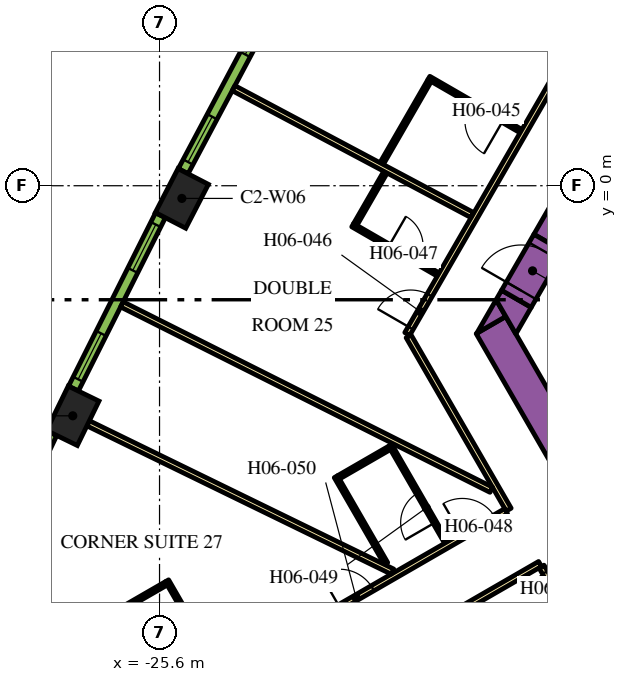
"""IFC4 building model, lengths in metres.
Left out: names, types, materials, properties, quantities, classifications, styles, units other than length and angle.
Written with IfcOpenShell. Run it as: python <this file> out.ifc"""

import sys

from ifc_helpers import new_model, si_unit, direction, frame, frame_2d, origin, origin_2d, place, context, subcontext, project, spatial, polyline, rectangle, outline, extrude, element, fill, save


model = new_model("IFC4")
c1 = context("Model", 3, precision=1e-05, world=origin(), true_north=direction((0.0, 1.0)))
c2 = subcontext(c1, "Body", "Model", "MODEL_VIEW")
j1 = project(units=[si_unit("LENGTHUNIT", "METRE"), si_unit("PLANEANGLEUNIT", "RADIAN")], contexts=[c1])
p1 = place(None, origin())
s1 = spatial("IfcSite", under=j1, at=p1, CompositionType="ELEMENT")
p2 = place(p1, origin())
s2 = spatial("IfcBuilding", under=s1, at=p2, CompositionType="ELEMENT")
p3 = place(p2, frame((0.0, 0.0, 87.6)))
s3 = spatial("IfcBuildingStorey", under=s2, at=p3, CompositionType="ELEMENT", Elevation=87.6)
for number, where, z_axis, x_axis in (
    (1, (-25.012, -0.334, 0.0), (0.0, 0.0, 1.0), (-0.459, -0.888, 0.0)),
    (2, (-27.883, -6.054, 0.0), (0.0, 0.0, 1.0), (-0.438, -0.899, 0.0)),
):
    element("IfcColumn", number, at=place(p3, frame(where, z_axis=z_axis, x_axis=x_axis)), inside=s3, PredefinedType="COLUMN", context=c2, shape_type="SweptSolid", body=[
        extrude(rectangle(XDim=1.3, YDim=0.9, at=origin_2d()), origin(), (0.0, 0.0, 1.0), 3.9),
    ])
p4 = place(p3, frame((-15.36, -1.503, 0.0), z_axis=(0.0, 0.0, 1.0), x_axis=(0.50000389221, 0.866023156604, 0.0)))
e3 = element("IfcWall", 3, at=p4, inside=s3, PredefinedType="SOLIDWALL", context=c2, shape_type="SweptSolid", body=[
    extrude(rectangle(XDim=21.0, YDim=0.9, at=frame_2d((10.5, 0.0))), origin(), (0.0, 0.0, 1.0), 3.9),
])
p5 = place(p3, frame((-12.134, -11.883, 0.0), z_axis=(0.0, 0.0, 1.0), x_axis=(-0.500005339912, 0.866022320763, 0.0)))
e4 = element("IfcWall", 4, at=p5, inside=s3, PredefinedType="SOLIDWALL", context=c2, shape_type="SweptSolid", body=[
    extrude(rectangle(XDim=9.488, YDim=0.9, at=frame_2d((4.744, 0.0))), origin(), (0.0, 0.0, 1.0), 3.9),
])
p6 = place(p3, origin())
e5 = element("IfcWall", 5, at=p6, inside=s3, PredefinedType="SOLIDWALL", context=c2, shape_type="SweptSolid", body=[
    extrude(outline(polyline([(-16.489, -3.44), (-17.251, -3.88), (-16.743, -3.0), (-16.489, -3.44)])), origin(), (0.0, 0.0, 1.0), 3.9),
])
e6 = element("IfcWall", 6, at=p6, inside=s3, PredefinedType="SOLIDWALL", context=c2, shape_type="SweptSolid", body=[
    extrude(outline(polyline([(-15.82, -3.201), (-16.223, -3.9), (-16.743, -3.0), (-16.599, -2.751), (-15.82, -3.201)])), origin(), (0.0, 0.0, 1.0), 3.9),
])
p7 = place(p3, frame((-16.209, -2.976, 0.0), z_axis=(0.0, 0.0, 1.0), x_axis=(0.499954529098, 0.86605165483, 0.0)))
e7 = element("IfcWall", 7, at=p7, inside=s3, PredefinedType="SOLIDWALL", context=c2, shape_type="SweptSolid", body=[
    extrude(rectangle(XDim=1.7, YDim=0.9, at=frame_2d((0.85, 0.0))), origin(), (0.0, 0.0, 1.0), 3.9),
])
p8 = place(p7, frame((0.25, 0.0, 0.0)))
e8 = element("IfcOpeningElement", 8, at=p8, cuts=e7, PredefinedType="OPENING", context=c2, shape_type="SweptSolid", body=[
    extrude(rectangle(XDim=1.2, YDim=2.1, at=frame_2d((0.6, 1.05))), frame((0.0, 0.46, 0.0), z_axis=(0.0, -1.0, 0.0), x_axis=(1.0, 0.0, 0.0)), (0.0, 0.0, 1.0), 0.92),
])
p9 = place(p3, frame((-19.081, -3.9, 0.0), z_axis=(0.0, 0.0, 1.0), x_axis=(0.499998313975, 0.866026377209, 0.0)))
e9 = element("IfcWall", 9, at=p9, inside=s3, PredefinedType="PARTITIONING", context=c2, shape_type="SweptSolid", body=[
    extrude(rectangle(XDim=25.766, YDim=0.15, at=frame_2d((12.883, 0.0))), origin(), (0.0, 0.0, 1.0), 2.75),
])
p10 = place(p9, frame((19.306, 0.0, 0.0)))
e10 = element("IfcOpeningElement", 10, at=p10, cuts=e9, PredefinedType="OPENING", context=c2, shape_type="SweptSolid", body=[
    extrude(rectangle(XDim=1.0, YDim=2.1, at=frame_2d((0.5, 1.05))), frame((0.0, 0.085, 0.0), z_axis=(0.0, -1.0, 0.0), x_axis=(1.0, 0.0, 0.0)), (0.0, 0.0, 1.0), 0.17),
])
p11 = place(p9, frame((18.0, 0.0, 0.0)))
e11 = element("IfcOpeningElement", 11, at=p11, cuts=e9, PredefinedType="OPENING", context=c2, shape_type="SweptSolid", body=[
    extrude(rectangle(XDim=1.0, YDim=2.1, at=frame_2d((0.5, 1.05))), frame((0.0, 0.085, 0.0), z_axis=(0.0, -1.0, 0.0), x_axis=(1.0, 0.0, 0.0)), (0.0, 0.0, 1.0), 0.17),
])
p12 = place(p9, frame((10.874, 0.0, 0.0)))
e12 = element("IfcOpeningElement", 12, at=p12, cuts=e9, PredefinedType="OPENING", context=c2, shape_type="SweptSolid", body=[
    extrude(rectangle(XDim=0.9, YDim=2.1, at=frame_2d((0.45, 1.05))), frame((0.0, 0.085, 0.0), z_axis=(0.0, -1.0, 0.0), x_axis=(1.0, 0.0, 0.0)), (0.0, 0.0, 1.0), 0.17),
])
p13 = place(p9, frame((8.548, 0.0, 0.0)))
e13 = element("IfcOpeningElement", 13, at=p13, cuts=e9, PredefinedType="OPENING", context=c2, shape_type="SweptSolid", body=[
    extrude(rectangle(XDim=1.1, YDim=2.1, at=frame_2d((0.55, 1.05))), frame((0.0, 0.085, 0.0), z_axis=(0.0, -1.0, 0.0), x_axis=(1.0, 0.0, 0.0)), (0.0, 0.0, 1.0), 0.17),
])
p14 = place(p9, frame((0.18, 0.0, 0.0)))
e14 = element("IfcOpeningElement", 14, at=p14, cuts=e9, PredefinedType="OPENING", context=c2, shape_type="SweptSolid", body=[
    extrude(rectangle(XDim=1.0, YDim=2.1, at=frame_2d((0.5, 1.05))), frame((0.0, 0.085, 0.0), z_axis=(0.0, -1.0, 0.0), x_axis=(1.0, 0.0, 0.0)), (0.0, 0.0, 1.0), 0.17),
])
p15 = place(p3, frame((-16.412, -8.523, 0.0), z_axis=(0.0, 0.0, 1.0), x_axis=(-0.500001929737, 0.866024289647, 0.0)))
e15 = element("IfcWall", 15, at=p15, inside=s3, PredefinedType="PARTITIONING", context=c2, shape_type="SweptSolid", body=[
    extrude(rectangle(XDim=5.268, YDim=0.15, at=frame_2d((2.634, 0.0))), origin(), (0.0, 0.0, 1.0), 2.75),
])
p16 = place(p3, frame((-28.211, -15.335, 0.0), z_axis=(0.0, 0.0, 1.0), x_axis=(0.866025884867, 0.49999916674, 0.0)))
e16 = element("IfcWall", 16, at=p16, inside=s3, PredefinedType="PARTITIONING", context=c2, shape_type="SweptSolid", body=[
    extrude(rectangle(XDim=13.543, YDim=0.15, at=frame_2d((6.772, 0.0))), origin(), (0.0, 0.0, 1.0), 2.75),
])
p17 = place(p16, frame((12.214, 0.0, 0.0)))
e17 = element("IfcOpeningElement", 17, at=p17, cuts=e16, PredefinedType="OPENING", context=c2, shape_type="SweptSolid", body=[
    extrude(rectangle(XDim=1.0, YDim=2.1, at=frame_2d((0.5, 1.05))), frame((0.0, 0.085, 0.0), z_axis=(0.0, -1.0, 0.0), x_axis=(1.0, 0.0, 0.0)), (0.0, 0.0, 1.0), 0.17),
])
p18 = place(p16, frame((8.488, 0.0, 0.0)))
e18 = element("IfcOpeningElement", 18, at=p18, cuts=e16, PredefinedType="OPENING", context=c2, shape_type="SweptSolid", body=[
    extrude(rectangle(XDim=1.0, YDim=2.1, at=frame_2d((0.5, 1.05))), frame((0.0, 0.085, 0.0), z_axis=(0.0, -1.0, 0.0), x_axis=(1.0, 0.0, 0.0)), (0.0, 0.0, 1.0), 0.17),
])
p19 = place(p3, frame((-15.587, -9.952, 0.0), z_axis=(0.0, 0.0, 1.0), x_axis=(-0.866017869832, -0.500013048961, 0.0)))
e19 = element("IfcWall", 19, at=p19, inside=s3, PredefinedType="PARTITIONING", context=c2, shape_type="SweptSolid", body=[
    extrude(rectangle(XDim=13.624, YDim=0.15, at=frame_2d((6.812, 0.0))), origin(), (0.0, 0.0, 1.0), 2.75),
])
p20 = place(p19, frame((4.134, 0.0, 0.0)))
e20 = element("IfcOpeningElement", 20, at=p20, cuts=e19, PredefinedType="OPENING", context=c2, shape_type="SweptSolid", body=[
    extrude(rectangle(XDim=1.0, YDim=2.1, at=frame_2d((0.5, 1.05))), frame((0.0, 0.085, 0.0), z_axis=(0.0, -1.0, 0.0), x_axis=(1.0, 0.0, 0.0)), (0.0, 0.0, 1.0), 0.17),
])
p21 = place(p3, frame((-12.918, -14.575, 0.0), z_axis=(0.0, 0.0, 1.0), x_axis=(-0.500009150678, 0.866020120573, 0.0)))
e21 = element("IfcWall", 21, at=p21, inside=s3, PredefinedType="PARTITIONING", context=c2, shape_type="SweptSolid", body=[
    extrude(rectangle(XDim=5.258, YDim=0.15, at=frame_2d((2.629, 0.0))), origin(), (0.0, 0.0, 1.0), 2.75),
])
p22 = place(p21, frame((4.078, 0.0, 0.0)))
e22 = element("IfcOpeningElement", 22, at=p22, cuts=e21, PredefinedType="OPENING", context=c2, shape_type="SweptSolid", body=[
    extrude(rectangle(XDim=1.0, YDim=2.1, at=frame_2d((0.5, 1.05))), frame((0.0, 0.085, 0.0), z_axis=(0.0, -1.0, 0.0), x_axis=(1.0, 0.0, 0.0)), (0.0, 0.0, 1.0), 0.17),
])
p23 = place(p3, frame((-27.479, -6.251, 0.0), z_axis=(0.0, 0.0, 1.0), x_axis=(0.898945877276, -0.438059710231, 0.0)))
e23 = element("IfcWall", 23, at=p23, inside=s3, PredefinedType="PARTITIONING", context=c2, shape_type="SweptSolid", body=[
    extrude(rectangle(XDim=8.909, YDim=0.15, at=frame_2d((4.455, 0.0))), origin(), (0.0, 0.0, 1.0), 2.75),
])
p24 = place(p3, frame((-23.652, 2.567, 0.0), z_axis=(0.0, 0.0, 1.0), x_axis=(0.883019237957, -0.469336793144, 0.0)))
e24 = element("IfcWall", 24, at=p24, inside=s3, PredefinedType="PARTITIONING", context=c2, shape_type="SweptSolid", body=[
    extrude(rectangle(XDim=7.111, YDim=0.15, at=frame_2d((3.555, 0.0))), origin(), (0.0, 0.0, 1.0), 2.75),
])
p25 = place(p3, frame((-26.591, -3.122, 0.0), z_axis=(0.0, 0.0, 1.0), x_axis=(0.893766213273, -0.448533115847, 0.0)))
e25 = element("IfcWall", 25, at=p25, inside=s3, PredefinedType="PARTITIONING", context=c2, shape_type="SweptSolid", body=[
    extrude(rectangle(XDim=10.875, YDim=0.15, at=frame_2d((5.438, 0.0))), origin(), (0.0, 0.0, 1.0), 2.75),
])
p26 = place(p3, frame((-16.087, 1.436, 0.0), z_axis=(0.0, 0.0, 1.0), x_axis=(-0.866034573852, 0.49998411664, 0.0)))
e26 = element("IfcWall", 26, at=p26, inside=s3, PredefinedType="PARTITIONING", context=c2, shape_type="SweptSolid", body=[
    extrude(rectangle(XDim=2.8, YDim=0.1, at=frame_2d((1.4, 0.0))), origin(), (0.0, 0.0, 1.0), 2.75),
])
p27 = place(p26, frame((0.55, 0.0, 0.0)))
e27 = element("IfcOpeningElement", 27, at=p27, cuts=e26, PredefinedType="OPENING", context=c2, shape_type="SweptSolid", body=[
    extrude(rectangle(XDim=1.0, YDim=2.1, at=frame_2d((0.5, 1.05))), frame((0.0, 0.06, 0.0), z_axis=(0.0, -1.0, 0.0), x_axis=(1.0, 0.0, 0.0)), (0.0, 0.0, 1.0), 0.12),
])
p28 = place(p3, frame((-18.494, 2.768, 0.0), z_axis=(0.0, 0.0, 1.0), x_axis=(-0.500004791531, -0.866022637375, 0.0)))
e28 = element("IfcWall", 28, at=p28, inside=s3, PredefinedType="PARTITIONING", context=c2, shape_type="SweptSolid", body=[
    extrude(rectangle(XDim=2.52, YDim=0.1, at=frame_2d((1.26, 0.0))), origin(), (0.0, 0.0, 1.0), 2.75),
])
p29 = place(p3, frame((-20.518, -1.037, 0.0), z_axis=(0.0, 0.0, 1.0), x_axis=(0.866021400173, -0.500006934395, 0.0)))
e29 = element("IfcWall", 29, at=p29, inside=s3, PredefinedType="PARTITIONING", context=c2, shape_type="SweptSolid", body=[
    extrude(rectangle(XDim=2.6, YDim=0.1, at=frame_2d((1.3, 0.0))), origin(), (0.0, 0.0, 1.0), 2.75),
])
p30 = place(p29, frame((1.1, 0.0, 0.0)))
e30 = element("IfcOpeningElement", 30, at=p30, cuts=e29, PredefinedType="OPENING", context=c2, shape_type="SweptSolid", body=[
    extrude(rectangle(XDim=0.9, YDim=2.1, at=frame_2d((0.45, 1.05))), frame((0.0, 0.06, 0.0), z_axis=(0.0, -1.0, 0.0), x_axis=(1.0, 0.0, 0.0)), (0.0, 0.0, 1.0), 0.12),
])
p31 = place(p3, frame((-20.449, -1.019, 0.0), z_axis=(0.0, 0.0, 1.0), x_axis=(0.500061319399, 0.865989998118, 0.0)))
e31 = element("IfcWall", 31, at=p31, inside=s3, PredefinedType="PARTITIONING", context=c2, shape_type="SweptSolid", body=[
    extrude(rectangle(XDim=1.58, YDim=0.1, at=frame_2d((0.79, 0.0))), origin(), (0.0, 0.0, 1.0), 2.75),
])
p32 = place(p3, frame((-18.055, -9.385, 0.0), z_axis=(0.0, 0.0, 1.0), x_axis=(-0.499939757307, 0.866060182126, 0.0)))
e32 = element("IfcWall", 32, at=p32, inside=s3, PredefinedType="PARTITIONING", context=c2, shape_type="SweptSolid", body=[
    extrude(rectangle(XDim=2.95, YDim=0.1, at=frame_2d((1.475, 0.0))), origin(), (0.0, 0.0, 1.0), 2.75),
])
p33 = place(p32, frame((0.6, 0.0, 0.0)))
e33 = element("IfcOpeningElement", 33, at=p33, cuts=e32, PredefinedType="OPENING", context=c2, shape_type="SweptSolid", body=[
    extrude(rectangle(XDim=0.9, YDim=2.1, at=frame_2d((0.45, 1.05))), frame((0.0, 0.06, 0.0), z_axis=(0.0, -1.0, 0.0), x_axis=(1.0, 0.0, 0.0)), (0.0, 0.0, 1.0), 0.12),
])
p34 = place(p3, frame((-19.549, -6.898, 0.0), z_axis=(0.0, 0.0, 1.0), x_axis=(-0.866043940782, -0.499967891604, 0.0)))
e34 = element("IfcWall", 34, at=p34, inside=s3, PredefinedType="PARTITIONING", context=c2, shape_type="SweptSolid", body=[
    extrude(rectangle(XDim=1.55, YDim=0.1, at=frame_2d((0.775, 0.0))), origin(), (0.0, 0.0, 1.0), 2.75),
])
p35 = place(p3, frame((-19.639, -9.941, 0.0), z_axis=(0.0, 0.0, 1.0), x_axis=(-0.499938597367, 0.866060851709, 0.0)))
e35 = element("IfcWall", 35, at=p35, inside=s3, PredefinedType="PARTITIONING", context=c2, shape_type="SweptSolid", body=[
    extrude(rectangle(XDim=2.64, YDim=0.1, at=frame_2d((1.32, 0.0))), origin(), (0.0, 0.0, 1.0), 2.75),
])
p36 = place(p3, frame((-24.004, -12.82, 0.0), z_axis=(0.0, 0.0, 1.0), x_axis=(-0.500011755427, 0.866018616679, 0.0)))
e36 = element("IfcWall", 36, at=p36, inside=s3, PredefinedType="PARTITIONING", context=c2, shape_type="SweptSolid", body=[
    extrude(rectangle(XDim=2.8, YDim=0.1, at=frame_2d((1.4, 0.0))), origin(), (0.0, 0.0, 1.0), 2.75),
])
p37 = place(p36, frame((0.6, 0.0, 0.0)))
e37 = element("IfcOpeningElement", 37, at=p37, cuts=e36, PredefinedType="OPENING", context=c2, shape_type="SweptSolid", body=[
    extrude(rectangle(XDim=0.9, YDim=2.1, at=frame_2d((0.45, 1.05))), frame((0.0, 0.06, 0.0), z_axis=(0.0, -1.0, 0.0), x_axis=(1.0, 0.0, 0.0)), (0.0, 0.0, 1.0), 0.12),
])
p38 = place(p3, frame((-25.422, -10.463, 0.0), z_axis=(0.0, 0.0, 1.0), x_axis=(-0.866024647952, -0.500001309137, 0.0)))
e38 = element("IfcWall", 38, at=p38, inside=s3, PredefinedType="PARTITIONING", context=c2, shape_type="SweptSolid", body=[
    extrude(rectangle(XDim=2.4, YDim=0.1, at=frame_2d((1.2, 0.0))), origin(), (0.0, 0.0, 1.0), 2.75),
])
p39 = place(p3, frame((-22.583, 4.887, 0.0), z_axis=(0.0, 0.0, 1.0), x_axis=(-0.469323203119, -0.883026461106, 0.0)))
e39 = element("IfcWall", 39, at=p39, inside=s3, PredefinedType="SOLIDWALL", context=c2, shape_type="SweptSolid", body=[
    extrude(rectangle(XDim=5.101, YDim=0.29, at=frame_2d((2.55, 0.0))), origin(), (0.0, 0.0, 1.0), 3.65),
])
p40 = place(p39, frame((0.273, 0.0, 0.9)))
e40 = element("IfcOpeningElement", 40, at=p40, cuts=e39, PredefinedType="OPENING", context=c2, shape_type="SweptSolid", body=[
    extrude(rectangle(XDim=1.35, YDim=2.15, at=frame_2d((0.675, 1.075))), frame((0.0, 0.155, 0.0), z_axis=(0.0, -1.0, 0.0), x_axis=(1.0, 0.0, 0.0)), (0.0, 0.0, 1.0), 0.31),
])
p41 = place(p39, frame((3.478, 0.0, 0.9)))
e41 = element("IfcOpeningElement", 41, at=p41, cuts=e39, PredefinedType="OPENING", context=c2, shape_type="SweptSolid", body=[
    extrude(rectangle(XDim=1.35, YDim=2.15, at=frame_2d((0.675, 1.075))), frame((0.0, 0.155, 0.0), z_axis=(0.0, -1.0, 0.0), x_axis=(1.0, 0.0, 0.0)), (0.0, 0.0, 1.0), 0.31),
])
p42 = place(p3, frame((-25.576, -0.778, 0.0), z_axis=(0.0, 0.0, 1.0), x_axis=(-0.448534297211, -0.893765620409, 0.0)))
e42 = element("IfcWall", 42, at=p42, inside=s3, PredefinedType="SOLIDWALL", context=c2, shape_type="SweptSolid", body=[
    extrude(rectangle(XDim=5.1, YDim=0.29, at=frame_2d((2.55, 0.0))), origin(), (0.0, 0.0, 1.0), 3.65),
])
p43 = place(p42, frame((0.272, 0.0, 0.9)))
e43 = element("IfcOpeningElement", 43, at=p43, cuts=e42, PredefinedType="OPENING", context=c2, shape_type="SweptSolid", body=[
    extrude(rectangle(XDim=1.35, YDim=2.15, at=frame_2d((0.675, 1.075))), frame((0.0, 0.155, 0.0), z_axis=(0.0, -1.0, 0.0), x_axis=(1.0, 0.0, 0.0)), (0.0, 0.0, 1.0), 0.31),
])
p44 = place(p42, frame((3.478, 0.0, 0.9)))
e44 = element("IfcOpeningElement", 44, at=p44, cuts=e42, PredefinedType="OPENING", context=c2, shape_type="SweptSolid", body=[
    extrude(rectangle(XDim=1.35, YDim=2.15, at=frame_2d((0.675, 1.075))), frame((0.0, 0.155, 0.0), z_axis=(0.0, -1.0, 0.0), x_axis=(1.0, 0.0, 0.0)), (0.0, 0.0, 1.0), 0.31),
])
p45 = place(p3, frame((-28.436, -6.511, 0.0), z_axis=(0.0, 0.0, 1.0), x_axis=(-0.427543726596, -0.903994669148, 0.0)))
e45 = element("IfcWall", 45, at=p45, inside=s3, PredefinedType="SOLIDWALL", context=c2, shape_type="SweptSolid", body=[
    extrude(rectangle(XDim=5.107, YDim=0.29, at=frame_2d((2.553, 0.0))), origin(), (0.0, 0.0, 1.0), 3.65),
])
p46 = place(p45, frame((0.285, 0.0, 0.9)))
e46 = element("IfcOpeningElement", 46, at=p46, cuts=e45, PredefinedType="OPENING", context=c2, shape_type="SweptSolid", body=[
    extrude(rectangle(XDim=1.35, YDim=2.15, at=frame_2d((0.675, 1.075))), frame((0.0, 0.155, 0.0), z_axis=(0.0, -1.0, 0.0), x_axis=(1.0, 0.0, 0.0)), (0.0, 0.0, 1.0), 0.31),
])
p47 = place(p45, frame((3.516, 0.0, 0.9)))
e47 = element("IfcOpeningElement", 47, at=p47, cuts=e45, PredefinedType="OPENING", context=c2, shape_type="SweptSolid", body=[
    extrude(rectangle(XDim=1.35, YDim=2.15, at=frame_2d((0.675, 1.075))), frame((0.0, 0.155, 0.0), z_axis=(0.0, -1.0, 0.0), x_axis=(1.0, 0.0, 0.0)), (0.0, 0.0, 1.0), 0.31),
])
p48 = place(p8, origin())
e48 = element("IfcDoor", 48, at=p48, inside=s3, OperationType="SINGLE_SWING_LEFT", PredefinedType="DOOR", context=c2, shape_type="SweptSolid", body=[
    extrude(rectangle(XDim=1.2, YDim=2.1, at=frame_2d((0.6, 1.05))), frame((0.0, 0.025, 0.0), z_axis=(0.0, -1.0, 0.0), x_axis=(1.0, 0.0, 0.0)), (0.0, 0.0, 1.0), 0.05),
])
fill(e8, e48)
p49 = place(p22, origin())
e49 = element("IfcDoor", 49, at=p49, inside=s3, OperationType="SINGLE_SWING_RIGHT", PredefinedType="DOOR", context=c2, shape_type="SweptSolid", body=[
    extrude(rectangle(XDim=1.0, YDim=2.1, at=frame_2d((0.5, 1.05))), frame((0.0, 0.025, 0.0), z_axis=(0.0, -1.0, 0.0), x_axis=(1.0, 0.0, 0.0)), (0.0, 0.0, 1.0), 0.05),
])
fill(e22, e49)
p50 = place(p27, origin())
e50 = element("IfcDoor", 50, at=p50, inside=s3, OperationType="SINGLE_SWING_RIGHT", PredefinedType="DOOR", context=c2, shape_type="SweptSolid", body=[
    extrude(rectangle(XDim=1.0, YDim=2.1, at=frame_2d((0.5, 1.05))), frame((0.0, 0.025, 0.0), z_axis=(0.0, -1.0, 0.0), x_axis=(1.0, 0.0, 0.0)), (0.0, 0.0, 1.0), 0.05),
])
fill(e27, e50)
p51 = place(p14, origin())
e51 = element("IfcDoor", 51, at=p51, inside=s3, OperationType="SINGLE_SWING_LEFT", PredefinedType="DOOR", context=c2, shape_type="SweptSolid", body=[
    extrude(rectangle(XDim=1.0, YDim=2.1, at=frame_2d((0.5, 1.05))), frame((0.0, 0.025, 0.0), z_axis=(0.0, -1.0, 0.0), x_axis=(1.0, 0.0, 0.0)), (0.0, 0.0, 1.0), 0.05),
])
fill(e14, e51)
p52 = place(p30, origin())
e52 = element("IfcDoor", 52, at=p52, inside=s3, OperationType="SINGLE_SWING_LEFT", PredefinedType="DOOR", context=c2, shape_type="SweptSolid", body=[
    extrude(rectangle(XDim=0.9, YDim=2.1, at=frame_2d((0.45, 1.05))), frame((0.0, 0.025, 0.0), z_axis=(0.0, -1.0, 0.0), x_axis=(1.0, 0.0, 0.0)), (0.0, 0.0, 1.0), 0.05),
])
fill(e30, e52)
p53 = place(p17, origin())
e53 = element("IfcDoor", 53, at=p53, inside=s3, OperationType="SINGLE_SWING_RIGHT", PredefinedType="DOOR", context=c2, shape_type="SweptSolid", body=[
    extrude(rectangle(XDim=1.0, YDim=2.1, at=frame_2d((0.5, 1.05))), frame((0.0, 0.025, 0.0), z_axis=(0.0, -1.0, 0.0), x_axis=(1.0, 0.0, 0.0)), (0.0, 0.0, 1.0), 0.05),
])
fill(e17, e53)
p54 = place(p33, origin())
e54 = element("IfcDoor", 54, at=p54, inside=s3, OperationType="SINGLE_SWING_LEFT", PredefinedType="DOOR", context=c2, shape_type="SweptSolid", body=[
    extrude(rectangle(XDim=0.9, YDim=2.1, at=frame_2d((0.45, 1.05))), frame((0.0, 0.025, 0.0), z_axis=(0.0, -1.0, 0.0), x_axis=(1.0, 0.0, 0.0)), (0.0, 0.0, 1.0), 0.05),
])
fill(e33, e54)
p55 = place(p18, origin())
e55 = element("IfcDoor", 55, at=p55, inside=s3, OperationType="SINGLE_SWING_RIGHT", PredefinedType="DOOR", context=c2, shape_type="SweptSolid", body=[
    extrude(rectangle(XDim=1.0, YDim=2.1, at=frame_2d((0.5, 1.05))), frame((0.0, 0.025, 0.0), z_axis=(0.0, -1.0, 0.0), x_axis=(1.0, 0.0, 0.0)), (0.0, 0.0, 1.0), 0.05),
])
fill(e18, e55)
p56 = place(p40, origin())
e56 = element("IfcWindow", 56, at=p56, inside=s3, PartitioningType="DOUBLE_PANEL_VERTICAL", PredefinedType="WINDOW", context=c2, shape_type="SweptSolid", body=[
    extrude(rectangle(XDim=1.35, YDim=2.15, at=frame_2d((0.675, 1.075))), frame((0.0, 0.015, 0.0), z_axis=(0.0, -1.0, 0.0), x_axis=(1.0, 0.0, 0.0)), (0.0, 0.0, 1.0), 0.06),
])
fill(e40, e56)
p57 = place(p41, origin())
e57 = element("IfcWindow", 57, at=p57, inside=s3, PartitioningType="DOUBLE_PANEL_VERTICAL", PredefinedType="WINDOW", context=c2, shape_type="SweptSolid", body=[
    extrude(rectangle(XDim=1.35, YDim=2.15, at=frame_2d((0.675, 1.075))), frame((0.0, 0.015, 0.0), z_axis=(0.0, -1.0, 0.0), x_axis=(1.0, 0.0, 0.0)), (0.0, 0.0, 1.0), 0.06),
])
fill(e41, e57)
p58 = place(p43, origin())
e58 = element("IfcWindow", 58, at=p58, inside=s3, PartitioningType="DOUBLE_PANEL_VERTICAL", PredefinedType="WINDOW", context=c2, shape_type="SweptSolid", body=[
    extrude(rectangle(XDim=1.35, YDim=2.15, at=frame_2d((0.675, 1.075))), frame((0.0, 0.015, 0.0), z_axis=(0.0, -1.0, 0.0), x_axis=(1.0, 0.0, 0.0)), (0.0, 0.0, 1.0), 0.06),
])
fill(e43, e58)
p59 = place(p44, origin())
e59 = element("IfcWindow", 59, at=p59, inside=s3, PartitioningType="DOUBLE_PANEL_VERTICAL", PredefinedType="WINDOW", context=c2, shape_type="SweptSolid", body=[
    extrude(rectangle(XDim=1.35, YDim=2.15, at=frame_2d((0.675, 1.075))), frame((0.0, 0.015, 0.0), z_axis=(0.0, -1.0, 0.0), x_axis=(1.0, 0.0, 0.0)), (0.0, 0.0, 1.0), 0.06),
])
fill(e44, e59)
save(model, sys.argv[1])
